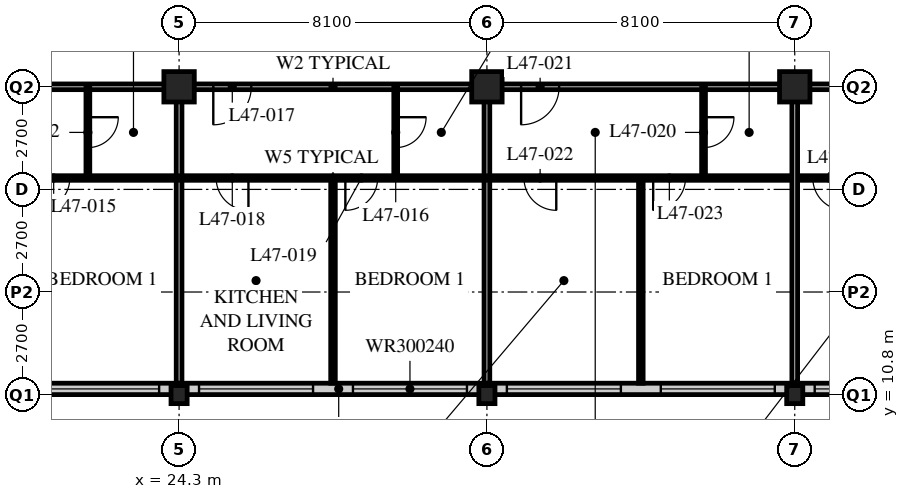
"""IFC4 building model, lengths in metres.
Left out: names, types, materials, properties, quantities, classifications, styles, units other than length and angle.
Written with IfcOpenShell. Run it as: python <this file> out.ifc"""

import sys

from ifc_helpers import new_model, si_unit, direction, frame, frame_2d, origin, origin_2d, place, context, subcontext, project, spatial, rectangle, hollow_rectangle, i_section, extrude, element, fill, save


model = new_model("IFC4")
c1 = context("Model", 3, precision=1e-05, world=origin(), true_north=direction((0.0, 1.0)))
c2 = subcontext(c1, "Body", "Model", "MODEL_VIEW")
j1 = project(units=[si_unit("LENGTHUNIT", "METRE"), si_unit("PLANEANGLEUNIT", "RADIAN")], contexts=[c1])
p1 = place(None, origin())
s1 = spatial("IfcSite", under=j1, at=p1, CompositionType="ELEMENT")
p2 = place(p1, origin())
s2 = spatial("IfcBuilding", under=s1, at=p2, CompositionType="ELEMENT")
p3 = place(p2, frame((0.0, 0.0, 184.8)))
s3 = spatial("IfcBuildingStorey", under=s2, at=p3, CompositionType="ELEMENT", Elevation=184.8)
p4 = place(p3, frame((24.3, 10.8, 0.0), z_axis=(0.0, 0.0, 1.0), x_axis=(1.0, 0.0, 0.0)))
e1 = element("IfcColumn", 1, at=p4, inside=s3, PredefinedType="COLUMN", context=c2, shape_type="SweptSolid", body=[
    extrude(i_section(OverallWidth=0.424, OverallDepth=0.475, WebThickness=0.048, FlangeThickness=0.077, FilletRadius=0.015, at=origin_2d()), origin(), (0.0, 0.0, 1.0), 3.6),
])
p5 = place(p3, frame((24.3, 18.9, 0.0), z_axis=(0.0, 0.0, 1.0), x_axis=(1.0, 0.0, 0.0)))
e2 = element("IfcColumn", 2, at=p5, inside=s3, PredefinedType="COLUMN", context=c2, shape_type="SweptSolid", body=[
    extrude(hollow_rectangle(XDim=0.8, YDim=0.8, WallThickness=0.08, at=origin_2d()), origin(), (0.0, 0.0, 1.0), 3.6),
])
p6 = place(p3, frame((32.4, 10.8, 0.0), z_axis=(0.0, 0.0, 1.0), x_axis=(1.0, 0.0, 0.0)))
e3 = element("IfcColumn", 3, at=p6, inside=s3, PredefinedType="COLUMN", context=c2, shape_type="SweptSolid", body=[
    extrude(i_section(OverallWidth=0.424, OverallDepth=0.475, WebThickness=0.048, FlangeThickness=0.077, FilletRadius=0.015, at=origin_2d()), origin(), (0.0, 0.0, 1.0), 3.6),
])
p7 = place(p3, frame((32.4, 18.9, 0.0), z_axis=(0.0, 0.0, 1.0), x_axis=(1.0, 0.0, 0.0)))
e4 = element("IfcColumn", 4, at=p7, inside=s3, PredefinedType="COLUMN", context=c2, shape_type="SweptSolid", body=[
    extrude(hollow_rectangle(XDim=0.8, YDim=0.8, WallThickness=0.08, at=origin_2d()), origin(), (0.0, 0.0, 1.0), 3.6),
])
p8 = place(p3, frame((40.5, 10.8, 0.0), z_axis=(0.0, 0.0, 1.0), x_axis=(1.0, 0.0, 0.0)))
e5 = element("IfcColumn", 5, at=p8, inside=s3, PredefinedType="COLUMN", context=c2, shape_type="SweptSolid", body=[
    extrude(i_section(OverallWidth=0.424, OverallDepth=0.475, WebThickness=0.048, FlangeThickness=0.077, FilletRadius=0.015, at=origin_2d()), origin(), (0.0, 0.0, 1.0), 3.6),
])
p9 = place(p3, frame((40.5, 18.9, 0.0), z_axis=(0.0, 0.0, 1.0), x_axis=(1.0, 0.0, 0.0)))
e6 = element("IfcColumn", 6, at=p9, inside=s3, PredefinedType="COLUMN", context=c2, shape_type="SweptSolid", body=[
    extrude(hollow_rectangle(XDim=0.8, YDim=0.8, WallThickness=0.08, at=origin_2d()), origin(), (0.0, 0.0, 1.0), 3.6),
])
p10 = place(p3, frame((8.4, 10.95, 0.0), z_axis=(0.0, 0.0, 1.0), x_axis=(1.0, 0.0, 0.0)))
e7 = element("IfcWall", 7, at=p10, inside=s3, PredefinedType="SOLIDWALL", context=c2, shape_type="SweptSolid", body=[
    extrude(rectangle(XDim=40.2, YDim=0.3, at=frame_2d((20.1, 0.0))), origin(), (0.0, 0.0, 1.0), 3.39),
])
p11 = place(p10, frame((0.225, 0.0, 0.6)))
e8 = element("IfcOpeningElement", 8, at=p11, cuts=e7, PredefinedType="OPENING", context=c2, shape_type="SweptSolid", body=[
    extrude(rectangle(XDim=3.0, YDim=2.4, at=frame_2d((1.5, 1.2))), frame((0.0, 0.16, 0.0), z_axis=(0.0, -1.0, 0.0), x_axis=(1.0, 0.0, 0.0)), (0.0, 0.0, 1.0), 0.32),
])
p12 = place(p10, frame((4.275, 0.0, 0.6)))
e9 = element("IfcOpeningElement", 9, at=p12, cuts=e7, PredefinedType="OPENING", context=c2, shape_type="SweptSolid", body=[
    extrude(rectangle(XDim=3.0, YDim=2.4, at=frame_2d((1.5, 1.2))), frame((0.0, 0.16, 0.0), z_axis=(0.0, -1.0, 0.0), x_axis=(1.0, 0.0, 0.0)), (0.0, 0.0, 1.0), 0.32),
])
p13 = place(p10, frame((8.325, 0.0, 0.6)))
e10 = element("IfcOpeningElement", 10, at=p13, cuts=e7, PredefinedType="OPENING", context=c2, shape_type="SweptSolid", body=[
    extrude(rectangle(XDim=3.0, YDim=2.4, at=frame_2d((1.5, 1.2))), frame((0.0, 0.16, 0.0), z_axis=(0.0, -1.0, 0.0), x_axis=(1.0, 0.0, 0.0)), (0.0, 0.0, 1.0), 0.32),
])
p14 = place(p10, frame((12.375, 0.0, 0.6)))
e11 = element("IfcOpeningElement", 11, at=p14, cuts=e7, PredefinedType="OPENING", context=c2, shape_type="SweptSolid", body=[
    extrude(rectangle(XDim=3.0, YDim=2.4, at=frame_2d((1.5, 1.2))), frame((0.0, 0.16, 0.0), z_axis=(0.0, -1.0, 0.0), x_axis=(1.0, 0.0, 0.0)), (0.0, 0.0, 1.0), 0.32),
])
p15 = place(p10, frame((16.425, 0.0, 0.6)))
e12 = element("IfcOpeningElement", 12, at=p15, cuts=e7, PredefinedType="OPENING", context=c2, shape_type="SweptSolid", body=[
    extrude(rectangle(XDim=3.0, YDim=2.4, at=frame_2d((1.5, 1.2))), frame((0.0, 0.16, 0.0), z_axis=(0.0, -1.0, 0.0), x_axis=(1.0, 0.0, 0.0)), (0.0, 0.0, 1.0), 0.32),
])
p16 = place(p10, frame((20.475, 0.0, 0.6)))
e13 = element("IfcOpeningElement", 13, at=p16, cuts=e7, PredefinedType="OPENING", context=c2, shape_type="SweptSolid", body=[
    extrude(rectangle(XDim=3.0, YDim=2.4, at=frame_2d((1.5, 1.2))), frame((0.0, 0.16, 0.0), z_axis=(0.0, -1.0, 0.0), x_axis=(1.0, 0.0, 0.0)), (0.0, 0.0, 1.0), 0.32),
])
p17 = place(p10, frame((24.525, 0.0, 0.6)))
e14 = element("IfcOpeningElement", 14, at=p17, cuts=e7, PredefinedType="OPENING", context=c2, shape_type="SweptSolid", body=[
    extrude(rectangle(XDim=3.0, YDim=2.4, at=frame_2d((1.5, 1.2))), frame((0.0, 0.16, 0.0), z_axis=(0.0, -1.0, 0.0), x_axis=(1.0, 0.0, 0.0)), (0.0, 0.0, 1.0), 0.32),
])
p18 = place(p10, frame((28.575, 0.0, 0.6)))
e15 = element("IfcOpeningElement", 15, at=p18, cuts=e7, PredefinedType="OPENING", context=c2, shape_type="SweptSolid", body=[
    extrude(rectangle(XDim=3.0, YDim=2.4, at=frame_2d((1.5, 1.2))), frame((0.0, 0.16, 0.0), z_axis=(0.0, -1.0, 0.0), x_axis=(1.0, 0.0, 0.0)), (0.0, 0.0, 1.0), 0.32),
])
p19 = place(p10, frame((32.625, 0.0, 0.6)))
e16 = element("IfcOpeningElement", 16, at=p19, cuts=e7, PredefinedType="OPENING", context=c2, shape_type="SweptSolid", body=[
    extrude(rectangle(XDim=3.0, YDim=2.4, at=frame_2d((1.5, 1.2))), frame((0.0, 0.16, 0.0), z_axis=(0.0, -1.0, 0.0), x_axis=(1.0, 0.0, 0.0)), (0.0, 0.0, 1.0), 0.32),
])
p20 = place(p10, frame((36.675, 0.0, 0.6)))
e17 = element("IfcOpeningElement", 17, at=p20, cuts=e7, PredefinedType="OPENING", context=c2, shape_type="SweptSolid", body=[
    extrude(rectangle(XDim=3.0, YDim=2.4, at=frame_2d((1.5, 1.2))), frame((0.0, 0.16, 0.0), z_axis=(0.0, -1.0, 0.0), x_axis=(1.0, 0.0, 0.0)), (0.0, 0.0, 1.0), 0.32),
])
p21 = place(p3, frame((12.15, 18.9, 0.0), z_axis=(0.0, 0.0, 1.0), x_axis=(1.0, 0.0, 0.0)))
e18 = element("IfcWall", 18, at=p21, inside=s3, PredefinedType="PARTITIONING", context=c2, shape_type="SweptSolid", body=[
    extrude(rectangle(XDim=32.4, YDim=0.15, at=frame_2d((16.2, 0.0))), origin(), (0.0, 0.0, 1.0), 2.778),
])
p22 = place(p21, frame((4.95, 0.0, 0.0)))
e19 = element("IfcOpeningElement", 19, at=p22, cuts=e18, PredefinedType="OPENING", context=c2, shape_type="SweptSolid", body=[
    extrude(rectangle(XDim=1.0, YDim=2.1, at=frame_2d((0.5, 1.05))), frame((0.0, 0.085, 0.0), z_axis=(0.0, -1.0, 0.0), x_axis=(1.0, 0.0, 0.0)), (0.0, 0.0, 1.0), 0.17),
])
p23 = place(p21, frame((13.05, 0.0, 0.0)))
e20 = element("IfcOpeningElement", 20, at=p23, cuts=e18, PredefinedType="OPENING", context=c2, shape_type="SweptSolid", body=[
    extrude(rectangle(XDim=1.0, YDim=2.1, at=frame_2d((0.5, 1.05))), frame((0.0, 0.085, 0.0), z_axis=(0.0, -1.0, 0.0), x_axis=(1.0, 0.0, 0.0)), (0.0, 0.0, 1.0), 0.17),
])
p24 = place(p21, frame((21.15, 0.0, 0.0)))
e21 = element("IfcOpeningElement", 21, at=p24, cuts=e18, PredefinedType="OPENING", context=c2, shape_type="SweptSolid", body=[
    extrude(rectangle(XDim=1.0, YDim=2.1, at=frame_2d((0.5, 1.05))), frame((0.0, 0.085, 0.0), z_axis=(0.0, -1.0, 0.0), x_axis=(1.0, 0.0, 0.0)), (0.0, 0.0, 1.0), 0.17),
])
p25 = place(p21, frame((1.525, 0.0, 0.0)))
e22 = element("IfcOpeningElement", 22, at=p25, cuts=e18, PredefinedType="OPENING", context=c2, shape_type="SweptSolid", body=[
    extrude(rectangle(XDim=1.0, YDim=2.1, at=frame_2d((0.5, 1.05))), frame((0.0, 0.085, 0.0), z_axis=(0.0, -1.0, 0.0), x_axis=(1.0, 0.0, 0.0)), (0.0, 0.0, 1.0), 0.17),
])
p26 = place(p21, frame((29.875, 0.0, 0.0)))
e23 = element("IfcOpeningElement", 23, at=p26, cuts=e18, PredefinedType="OPENING", context=c2, shape_type="SweptSolid", body=[
    extrude(rectangle(XDim=1.0, YDim=2.1, at=frame_2d((0.5, 1.05))), frame((0.0, 0.085, 0.0), z_axis=(0.0, -1.0, 0.0), x_axis=(1.0, 0.0, 0.0)), (0.0, 0.0, 1.0), 0.17),
])
p27 = place(p3, frame((21.9, 18.9, 0.0), z_axis=(0.0, 0.0, 1.0), x_axis=(0.0, -1.0, 0.0)))
e24 = element("IfcWall", 24, at=p27, inside=s3, PredefinedType="PARTITIONING", context=c2, shape_type="SweptSolid", body=[
    extrude(rectangle(XDim=2.4, YDim=0.1, at=frame_2d((1.2, 0.0))), origin(), (0.0, 0.0, 1.0), 3.39),
])
p28 = place(p27, frame((0.8, 0.0, 0.0)))
e25 = element("IfcOpeningElement", 25, at=p28, cuts=e24, PredefinedType="OPENING", context=c2, shape_type="SweptSolid", body=[
    extrude(rectangle(XDim=0.8, YDim=2.1, at=frame_2d((0.4, 1.05))), frame((0.0, 0.06, 0.0), z_axis=(0.0, -1.0, 0.0), x_axis=(1.0, 0.0, 0.0)), (0.0, 0.0, 1.0), 0.12),
])
p29 = place(p3, frame((24.3, 18.9, 0.0), z_axis=(0.0, 0.0, 1.0), x_axis=(0.0, -1.0, 0.0)))
e26 = element("IfcWall", 26, at=p29, inside=s3, PredefinedType="PARTITIONING", context=c2, shape_type="SweptSolid", body=[
    extrude(rectangle(XDim=7.8, YDim=0.15, at=frame_2d((3.9, 0.0))), origin(), (0.0, 0.0, 1.0), 2.778),
])
p30 = place(p3, frame((30.0, 18.9, 0.0), z_axis=(0.0, 0.0, 1.0), x_axis=(0.0, -1.0, 0.0)))
e27 = element("IfcWall", 27, at=p30, inside=s3, PredefinedType="PARTITIONING", context=c2, shape_type="SweptSolid", body=[
    extrude(rectangle(XDim=2.4, YDim=0.1, at=frame_2d((1.2, 0.0))), origin(), (0.0, 0.0, 1.0), 3.39),
])
p31 = place(p30, frame((0.8, 0.0, 0.0)))
e28 = element("IfcOpeningElement", 28, at=p31, cuts=e27, PredefinedType="OPENING", context=c2, shape_type="SweptSolid", body=[
    extrude(rectangle(XDim=0.8, YDim=2.1, at=frame_2d((0.4, 1.05))), frame((0.0, 0.06, 0.0), z_axis=(0.0, -1.0, 0.0), x_axis=(1.0, 0.0, 0.0)), (0.0, 0.0, 1.0), 0.12),
])
p32 = place(p3, frame((28.35, 16.5, 0.0), z_axis=(0.0, 0.0, 1.0), x_axis=(0.0, -1.0, 0.0)))
e29 = element("IfcWall", 29, at=p32, inside=s3, PredefinedType="PARTITIONING", context=c2, shape_type="SweptSolid", body=[
    extrude(rectangle(XDim=5.4, YDim=0.12, at=frame_2d((2.7, 0.0))), origin(), (0.0, 0.0, 1.0), 3.39),
])
p33 = place(p3, frame((32.4, 18.9, 0.0), z_axis=(0.0, 0.0, 1.0), x_axis=(0.0, -1.0, 0.0)))
e30 = element("IfcWall", 30, at=p33, inside=s3, PredefinedType="PARTITIONING", context=c2, shape_type="SweptSolid", body=[
    extrude(rectangle(XDim=7.8, YDim=0.15, at=frame_2d((3.9, 0.0))), origin(), (0.0, 0.0, 1.0), 2.778),
])
p34 = place(p3, frame((38.1, 18.9, 0.0), z_axis=(0.0, 0.0, 1.0), x_axis=(0.0, -1.0, 0.0)))
e31 = element("IfcWall", 31, at=p34, inside=s3, PredefinedType="PARTITIONING", context=c2, shape_type="SweptSolid", body=[
    extrude(rectangle(XDim=2.4, YDim=0.1, at=frame_2d((1.2, 0.0))), origin(), (0.0, 0.0, 1.0), 3.39),
])
p35 = place(p34, frame((0.8, 0.0, 0.0)))
e32 = element("IfcOpeningElement", 32, at=p35, cuts=e31, PredefinedType="OPENING", context=c2, shape_type="SweptSolid", body=[
    extrude(rectangle(XDim=0.8, YDim=2.1, at=frame_2d((0.4, 1.05))), frame((0.0, 0.06, 0.0), z_axis=(0.0, -1.0, 0.0), x_axis=(1.0, 0.0, 0.0)), (0.0, 0.0, 1.0), 0.12),
])
p36 = place(p3, frame((36.45, 16.5, 0.0), z_axis=(0.0, 0.0, 1.0), x_axis=(0.0, -1.0, 0.0)))
e33 = element("IfcWall", 33, at=p36, inside=s3, PredefinedType="PARTITIONING", context=c2, shape_type="SweptSolid", body=[
    extrude(rectangle(XDim=5.4, YDim=0.12, at=frame_2d((2.7, 0.0))), origin(), (0.0, 0.0, 1.0), 3.39),
])
p37 = place(p3, frame((8.15, 16.5, 0.0), z_axis=(0.0, 0.0, 1.0), x_axis=(1.0, 0.0, 0.0)))
e34 = element("IfcWall", 34, at=p37, inside=s3, PredefinedType="PARTITIONING", context=c2, shape_type="SweptSolid", body=[
    extrude(rectangle(XDim=40.4, YDim=0.12, at=frame_2d((20.2, 0.0))), origin(), (0.0, 0.0, 1.0), 3.39),
])
p38 = place(p37, frame((9.025, 0.0, 0.0)))
e35 = element("IfcOpeningElement", 35, at=p38, cuts=e34, PredefinedType="OPENING", context=c2, shape_type="SweptSolid", body=[
    extrude(rectangle(XDim=0.85, YDim=2.1, at=frame_2d((0.425, 1.05))), frame((0.0, 0.07, 0.0), z_axis=(0.0, -1.0, 0.0), x_axis=(1.0, 0.0, 0.0)), (0.0, 0.0, 1.0), 0.14),
])
p39 = place(p37, frame((12.425, 0.0, 0.0)))
e36 = element("IfcOpeningElement", 36, at=p39, cuts=e34, PredefinedType="OPENING", context=c2, shape_type="SweptSolid", body=[
    extrude(rectangle(XDim=0.85, YDim=2.1, at=frame_2d((0.425, 1.05))), frame((0.0, 0.07, 0.0), z_axis=(0.0, -1.0, 0.0), x_axis=(1.0, 0.0, 0.0)), (0.0, 0.0, 1.0), 0.14),
])
p40 = place(p37, frame((17.125, 0.0, 0.0)))
e37 = element("IfcOpeningElement", 37, at=p40, cuts=e34, PredefinedType="OPENING", context=c2, shape_type="SweptSolid", body=[
    extrude(rectangle(XDim=0.85, YDim=2.1, at=frame_2d((0.425, 1.05))), frame((0.0, 0.07, 0.0), z_axis=(0.0, -1.0, 0.0), x_axis=(1.0, 0.0, 0.0)), (0.0, 0.0, 1.0), 0.14),
])
p41 = place(p37, frame((20.525, 0.0, 0.0)))
e38 = element("IfcOpeningElement", 38, at=p41, cuts=e34, PredefinedType="OPENING", context=c2, shape_type="SweptSolid", body=[
    extrude(rectangle(XDim=0.85, YDim=2.1, at=frame_2d((0.425, 1.05))), frame((0.0, 0.07, 0.0), z_axis=(0.0, -1.0, 0.0), x_axis=(1.0, 0.0, 0.0)), (0.0, 0.0, 1.0), 0.14),
])
p42 = place(p37, frame((25.225, 0.0, 0.0)))
e39 = element("IfcOpeningElement", 39, at=p42, cuts=e34, PredefinedType="OPENING", context=c2, shape_type="SweptSolid", body=[
    extrude(rectangle(XDim=0.85, YDim=2.1, at=frame_2d((0.425, 1.05))), frame((0.0, 0.07, 0.0), z_axis=(0.0, -1.0, 0.0), x_axis=(1.0, 0.0, 0.0)), (0.0, 0.0, 1.0), 0.14),
])
p43 = place(p37, frame((28.625, 0.0, 0.0)))
e40 = element("IfcOpeningElement", 40, at=p43, cuts=e34, PredefinedType="OPENING", context=c2, shape_type="SweptSolid", body=[
    extrude(rectangle(XDim=0.85, YDim=2.1, at=frame_2d((0.425, 1.05))), frame((0.0, 0.07, 0.0), z_axis=(0.0, -1.0, 0.0), x_axis=(1.0, 0.0, 0.0)), (0.0, 0.0, 1.0), 0.14),
])
p44 = place(p37, frame((6.725, 0.0, 0.0)))
e41 = element("IfcOpeningElement", 41, at=p44, cuts=e34, PredefinedType="OPENING", context=c2, shape_type="SweptSolid", body=[
    extrude(rectangle(XDim=0.85, YDim=2.1, at=frame_2d((0.425, 1.05))), frame((0.0, 0.07, 0.0), z_axis=(0.0, -1.0, 0.0), x_axis=(1.0, 0.0, 0.0)), (0.0, 0.0, 1.0), 0.14),
])
p45 = place(p37, frame((2.875, 0.0, 0.0)))
e42 = element("IfcOpeningElement", 42, at=p45, cuts=e34, PredefinedType="OPENING", context=c2, shape_type="SweptSolid", body=[
    extrude(rectangle(XDim=0.85, YDim=2.1, at=frame_2d((0.425, 1.05))), frame((0.0, 0.07, 0.0), z_axis=(0.0, -1.0, 0.0), x_axis=(1.0, 0.0, 0.0)), (0.0, 0.0, 1.0), 0.14),
])
p46 = place(p37, frame((32.825, 0.0, 0.0)))
e43 = element("IfcOpeningElement", 43, at=p46, cuts=e34, PredefinedType="OPENING", context=c2, shape_type="SweptSolid", body=[
    extrude(rectangle(XDim=0.85, YDim=2.1, at=frame_2d((0.425, 1.05))), frame((0.0, 0.07, 0.0), z_axis=(0.0, -1.0, 0.0), x_axis=(1.0, 0.0, 0.0)), (0.0, 0.0, 1.0), 0.14),
])
p47 = place(p37, frame((36.675, 0.0, 0.0)))
e44 = element("IfcOpeningElement", 44, at=p47, cuts=e34, PredefinedType="OPENING", context=c2, shape_type="SweptSolid", body=[
    extrude(rectangle(XDim=0.85, YDim=2.1, at=frame_2d((0.425, 1.05))), frame((0.0, 0.07, 0.0), z_axis=(0.0, -1.0, 0.0), x_axis=(1.0, 0.0, 0.0)), (0.0, 0.0, 1.0), 0.14),
])
p48 = place(p3, frame((40.5, 18.9, 0.0), z_axis=(0.0, 0.0, 1.0), x_axis=(0.0, -1.0, 0.0)))
e45 = element("IfcWall", 45, at=p48, inside=s3, PredefinedType="PARTITIONING", context=c2, shape_type="SweptSolid", body=[
    extrude(rectangle(XDim=7.8, YDim=0.15, at=frame_2d((3.9, 0.0))), origin(), (0.0, 0.0, 1.0), 2.778),
])
p49 = place(p14, origin())
e46 = element("IfcWindow", 46, at=p49, inside=s3, PartitioningType="SINGLE_PANEL", PredefinedType="WINDOW", context=c2, shape_type="SweptSolid", body=[
    extrude(rectangle(XDim=3.0, YDim=2.4, at=frame_2d((1.5, 1.2))), frame((0.0, 0.03, 0.0), z_axis=(0.0, -1.0, 0.0), x_axis=(1.0, 0.0, 0.0)), (0.0, 0.0, 1.0), 0.06),
])
fill(e11, e46)
p50 = place(p15, origin())
e47 = element("IfcWindow", 47, at=p50, inside=s3, PartitioningType="SINGLE_PANEL", PredefinedType="WINDOW", context=c2, shape_type="SweptSolid", body=[
    extrude(rectangle(XDim=3.0, YDim=2.4, at=frame_2d((1.5, 1.2))), frame((0.0, 0.03, 0.0), z_axis=(0.0, -1.0, 0.0), x_axis=(1.0, 0.0, 0.0)), (0.0, 0.0, 1.0), 0.06),
])
fill(e12, e47)
p51 = place(p16, origin())
e48 = element("IfcWindow", 48, at=p51, inside=s3, PartitioningType="SINGLE_PANEL", PredefinedType="WINDOW", context=c2, shape_type="SweptSolid", body=[
    extrude(rectangle(XDim=3.0, YDim=2.4, at=frame_2d((1.5, 1.2))), frame((0.0, 0.03, 0.0), z_axis=(0.0, -1.0, 0.0), x_axis=(1.0, 0.0, 0.0)), (0.0, 0.0, 1.0), 0.06),
])
fill(e13, e48)
p52 = place(p17, origin())
e49 = element("IfcWindow", 49, at=p52, inside=s3, PartitioningType="SINGLE_PANEL", PredefinedType="WINDOW", context=c2, shape_type="SweptSolid", body=[
    extrude(rectangle(XDim=3.0, YDim=2.4, at=frame_2d((1.5, 1.2))), frame((0.0, 0.03, 0.0), z_axis=(0.0, -1.0, 0.0), x_axis=(1.0, 0.0, 0.0)), (0.0, 0.0, 1.0), 0.06),
])
fill(e14, e49)
p53 = place(p18, origin())
e50 = element("IfcWindow", 50, at=p53, inside=s3, PartitioningType="SINGLE_PANEL", PredefinedType="WINDOW", context=c2, shape_type="SweptSolid", body=[
    extrude(rectangle(XDim=3.0, YDim=2.4, at=frame_2d((1.5, 1.2))), frame((0.0, 0.03, 0.0), z_axis=(0.0, -1.0, 0.0), x_axis=(1.0, 0.0, 0.0)), (0.0, 0.0, 1.0), 0.06),
])
fill(e15, e50)
p54 = place(p19, origin())
e51 = element("IfcWindow", 51, at=p54, inside=s3, PartitioningType="SINGLE_PANEL", PredefinedType="WINDOW", context=c2, shape_type="SweptSolid", body=[
    extrude(rectangle(XDim=3.0, YDim=2.4, at=frame_2d((1.5, 1.2))), frame((0.0, 0.03, 0.0), z_axis=(0.0, -1.0, 0.0), x_axis=(1.0, 0.0, 0.0)), (0.0, 0.0, 1.0), 0.06),
])
fill(e16, e51)
p55 = place(p28, origin())
e52 = element("IfcDoor", 52, at=p55, inside=s3, OperationType="SINGLE_SWING_LEFT", PredefinedType="DOOR", context=c2, shape_type="SweptSolid", body=[
    extrude(rectangle(XDim=0.8, YDim=2.1, at=frame_2d((0.4, 1.05))), frame((0.0, 0.025, 0.0), z_axis=(0.0, -1.0, 0.0), x_axis=(1.0, 0.0, 0.0)), (0.0, 0.0, 1.0), 0.05),
])
fill(e25, e52)
p56 = place(p39, origin())
e53 = element("IfcDoor", 53, at=p56, inside=s3, OperationType="SINGLE_SWING_RIGHT", PredefinedType="DOOR", context=c2, shape_type="SweptSolid", body=[
    extrude(rectangle(XDim=0.85, YDim=2.1, at=frame_2d((0.425, 1.05))), frame((0.0, 0.025, 0.0), z_axis=(0.0, -1.0, 0.0), x_axis=(1.0, 0.0, 0.0)), (0.0, 0.0, 1.0), 0.05),
])
fill(e36, e53)
p57 = place(p31, origin())
e54 = element("IfcDoor", 54, at=p57, inside=s3, OperationType="SINGLE_SWING_LEFT", PredefinedType="DOOR", context=c2, shape_type="SweptSolid", body=[
    extrude(rectangle(XDim=0.8, YDim=2.1, at=frame_2d((0.4, 1.05))), frame((0.0, 0.025, 0.0), z_axis=(0.0, -1.0, 0.0), x_axis=(1.0, 0.0, 0.0)), (0.0, 0.0, 1.0), 0.05),
])
fill(e28, e54)
p58 = place(p23, origin())
e55 = element("IfcDoor", 55, at=p58, inside=s3, OperationType="SINGLE_SWING_RIGHT", PredefinedType="DOOR", context=c2, shape_type="SweptSolid", body=[
    extrude(rectangle(XDim=1.0, YDim=2.1, at=frame_2d((0.5, 1.05))), frame((0.0, 0.025, 0.0), z_axis=(0.0, -1.0, 0.0), x_axis=(1.0, 0.0, 0.0)), (0.0, 0.0, 1.0), 0.05),
])
fill(e20, e55)
p59 = place(p40, origin())
e56 = element("IfcDoor", 56, at=p59, inside=s3, OperationType="SINGLE_SWING_LEFT", PredefinedType="DOOR", context=c2, shape_type="SweptSolid", body=[
    extrude(rectangle(XDim=0.85, YDim=2.1, at=frame_2d((0.425, 1.05))), frame((0.0, 0.025, 0.0), z_axis=(0.0, -1.0, 0.0), x_axis=(1.0, 0.0, 0.0)), (0.0, 0.0, 1.0), 0.05),
])
fill(e37, e56)
p60 = place(p41, origin())
e57 = element("IfcDoor", 57, at=p60, inside=s3, OperationType="SINGLE_SWING_RIGHT", PredefinedType="DOOR", context=c2, shape_type="SweptSolid", body=[
    extrude(rectangle(XDim=0.85, YDim=2.1, at=frame_2d((0.425, 1.05))), frame((0.0, 0.025, 0.0), z_axis=(0.0, -1.0, 0.0), x_axis=(1.0, 0.0, 0.0)), (0.0, 0.0, 1.0), 0.05),
])
fill(e38, e57)
p61 = place(p35, origin())
e58 = element("IfcDoor", 58, at=p61, inside=s3, OperationType="SINGLE_SWING_LEFT", PredefinedType="DOOR", context=c2, shape_type="SweptSolid", body=[
    extrude(rectangle(XDim=0.8, YDim=2.1, at=frame_2d((0.4, 1.05))), frame((0.0, 0.025, 0.0), z_axis=(0.0, -1.0, 0.0), x_axis=(1.0, 0.0, 0.0)), (0.0, 0.0, 1.0), 0.05),
])
fill(e32, e58)
p62 = place(p24, origin())
e59 = element("IfcDoor", 59, at=p62, inside=s3, OperationType="SINGLE_SWING_RIGHT", PredefinedType="DOOR", context=c2, shape_type="SweptSolid", body=[
    extrude(rectangle(XDim=1.0, YDim=2.1, at=frame_2d((0.5, 1.05))), frame((0.0, 0.025, 0.0), z_axis=(0.0, -1.0, 0.0), x_axis=(1.0, 0.0, 0.0)), (0.0, 0.0, 1.0), 0.05),
])
fill(e21, e59)
p63 = place(p42, origin())
e60 = element("IfcDoor", 60, at=p63, inside=s3, OperationType="SINGLE_SWING_LEFT", PredefinedType="DOOR", context=c2, shape_type="SweptSolid", body=[
    extrude(rectangle(XDim=0.85, YDim=2.1, at=frame_2d((0.425, 1.05))), frame((0.0, 0.025, 0.0), z_axis=(0.0, -1.0, 0.0), x_axis=(1.0, 0.0, 0.0)), (0.0, 0.0, 1.0), 0.05),
])
fill(e39, e60)
p64 = place(p43, origin())
e61 = element("IfcDoor", 61, at=p64, inside=s3, OperationType="SINGLE_SWING_RIGHT", PredefinedType="DOOR", context=c2, shape_type="SweptSolid", body=[
    extrude(rectangle(XDim=0.85, YDim=2.1, at=frame_2d((0.425, 1.05))), frame((0.0, 0.025, 0.0), z_axis=(0.0, -1.0, 0.0), x_axis=(1.0, 0.0, 0.0)), (0.0, 0.0, 1.0), 0.05),
])
fill(e40, e61)
p65 = place(p46, origin())
e62 = element("IfcDoor", 62, at=p65, inside=s3, OperationType="SINGLE_SWING_LEFT", PredefinedType="DOOR", context=c2, shape_type="SweptSolid", body=[
    extrude(rectangle(XDim=0.85, YDim=2.1, at=frame_2d((0.425, 1.05))), frame((0.0, 0.025, 0.0), z_axis=(0.0, -1.0, 0.0), x_axis=(1.0, 0.0, 0.0)), (0.0, 0.0, 1.0), 0.05),
])
fill(e43, e62)
save(model, sys.argv[1])
